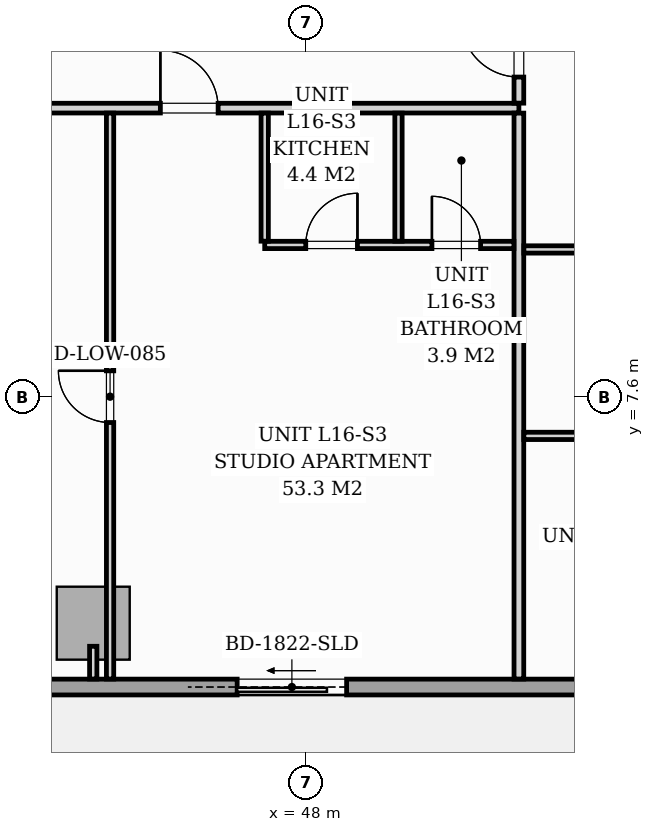
"""IFC4 building model, lengths in metres.
Left out: names, types, materials, properties, quantities, classifications, styles, units other than length and angle.
Written with IfcOpenShell. Run it as: python <this file> out.ifc"""

import sys

from ifc_helpers import new_model, si_unit, direction, frame, frame_2d, origin, origin_2d, place, context, subcontext, project, spatial, rectangle, extrude, source, transform, mapped, element, fill, save


model = new_model("IFC4")
c1 = context("Model", 3, precision=1e-05, world=origin(), true_north=direction((0.0, 1.0)))
c2 = subcontext(c1, "Body", "Model", "MODEL_VIEW")
j1 = project(units=[si_unit("LENGTHUNIT", "METRE"), si_unit("PLANEANGLEUNIT", "RADIAN")], contexts=[c1])
p1 = place(None, origin())
s1 = spatial("IfcSite", under=j1, at=p1, CompositionType="ELEMENT")
p2 = place(p1, origin())
s2 = spatial("IfcBuilding", under=s1, at=p2, CompositionType="ELEMENT")
p3 = place(p2, frame((0.0, 0.0, 58.2)))
s3 = spatial("IfcBuildingStorey", under=s2, at=p3, CompositionType="ELEMENT", Elevation=58.2)
m1 = source(origin(), c2, "Body", "SweptSolid", [
    extrude(rectangle(XDim=1.2, YDim=1.2, at=origin_2d()), origin(), (0.0, 0.0, 1.0), 3.196),
])
p4 = place(p3, frame((44.5, 3.88, 0.002), z_axis=(0.0, 0.0, 1.0), x_axis=(1.0, 0.0, 0.0)))
e1 = element("IfcColumn", 1, at=p4, inside=s3, PredefinedType="COLUMN", context=c2, shape_type="MappedRepresentation", body=[
    mapped(m1, transform((0.0, 0.0, 0.0), scale=1.0)),
])
p5 = place(p3, frame((57.3, 2.83, 0.0), z_axis=(0.0, 0.0, 1.0), x_axis=(-1.0, 0.0, 0.0)))
e2 = element("IfcWall", 2, at=p5, inside=s3, PredefinedType="STANDARD", context=c2, shape_type="SweptSolid", body=[
    extrude(rectangle(XDim=17.15, YDim=0.26, at=frame_2d((8.575, 0.0))), origin(), (0.0, 0.0, 1.0), 2.94),
])
p6 = place(p5, frame((8.633, 0.0, 0.0)))
e3 = element("IfcOpeningElement", 3, at=p6, cuts=e2, PredefinedType="OPENING", context=c2, shape_type="SweptSolid", body=[
    extrude(rectangle(XDim=1.8, YDim=2.06, at=frame_2d((0.9, 1.03))), frame((0.0, 0.14, 0.0), z_axis=(0.0, -1.0, 0.0), x_axis=(1.0, 0.0, 0.0)), (0.0, 0.0, 1.0), 0.28),
])
p7 = place(p5, frame((2.05, 0.0, 0.65)))
e4 = element("IfcOpeningElement", 4, at=p7, cuts=e2, PredefinedType="OPENING", context=c2, shape_type="SweptSolid", body=[
    extrude(rectangle(XDim=1.6, YDim=1.5, at=frame_2d((0.8, 0.75))), frame((0.0, 0.14, 0.0), z_axis=(0.0, -1.0, 0.0), x_axis=(1.0, 0.0, 0.0)), (0.0, 0.0, 1.0), 0.28),
])
p8 = place(p3, frame((16.3, 12.35, 0.0), z_axis=(0.0, 0.0, 1.0), x_axis=(1.0, 0.0, 0.0)))
e5 = element("IfcWall", 5, at=p8, inside=s3, PredefinedType="PARTITIONING", context=c2, shape_type="SweptSolid", body=[
    extrude(rectangle(XDim=35.2, YDim=0.16, at=frame_2d((17.6, 0.0))), origin(), (0.0, 0.0, 1.0), 2.94),
])
p9 = place(p8, frame((6.307, 0.0, 0.0)))
e6 = element("IfcOpeningElement", 6, at=p9, cuts=e5, PredefinedType="OPENING", context=c2, shape_type="SweptSolid", body=[
    extrude(rectangle(XDim=0.95, YDim=2.06, at=frame_2d((0.475, 1.03))), frame((0.0, 0.09, 0.0), z_axis=(0.0, -1.0, 0.0), x_axis=(1.0, 0.0, 0.0)), (0.0, 0.0, 1.0), 0.18),
])
p10 = place(p8, frame((18.392, 0.0, 0.0)))
e7 = element("IfcOpeningElement", 7, at=p10, cuts=e5, PredefinedType="OPENING", context=c2, shape_type="SweptSolid", body=[
    extrude(rectangle(XDim=0.95, YDim=2.06, at=frame_2d((0.475, 1.03))), frame((0.0, 0.09, 0.0), z_axis=(0.0, -1.0, 0.0), x_axis=(1.0, 0.0, 0.0)), (0.0, 0.0, 1.0), 0.18),
])
p11 = place(p8, frame((29.304, 0.0, 0.0)))
e8 = element("IfcOpeningElement", 8, at=p11, cuts=e5, PredefinedType="OPENING", context=c2, shape_type="SweptSolid", body=[
    extrude(rectangle(XDim=0.95, YDim=2.06, at=frame_2d((0.475, 1.03))), frame((0.0, 0.09, 0.0), z_axis=(0.0, -1.0, 0.0), x_axis=(1.0, 0.0, 0.0)), (0.0, 0.0, 1.0), 0.18),
])
p12 = place(p3, frame((51.5, 2.962, 0.0), z_axis=(0.0, 0.0, 1.0), x_axis=(0.0, 1.0, 0.0)))
e9 = element("IfcWall", 9, at=p12, inside=s3, PredefinedType="PARTITIONING", context=c2, shape_type="SweptSolid", body=[
    extrude(rectangle(XDim=9.306, YDim=0.16, at=frame_2d((4.653, 0.0))), origin(), (0.0, 0.0, 1.0), 2.94),
])
p13 = place(p3, frame((51.5, 12.432, 0.0), z_axis=(0.0, 0.0, 1.0), x_axis=(0.0, 1.0, 0.0)))
e10 = element("IfcWall", 10, at=p13, inside=s3, PredefinedType="PARTITIONING", context=c2, shape_type="SweptSolid", body=[
    extrude(rectangle(XDim=15.006, YDim=0.16, at=frame_2d((7.503, 0.0))), origin(), (0.0, 0.0, 1.0), 2.94),
])
p14 = place(p13, frame((0.429, 0.0, 0.0)))
e11 = element("IfcOpeningElement", 11, at=p14, cuts=e10, PredefinedType="OPENING", context=c2, shape_type="SweptSolid", body=[
    extrude(rectangle(XDim=0.95, YDim=2.06, at=frame_2d((0.475, 1.03))), frame((0.0, 0.09, 0.0), z_axis=(0.0, -1.0, 0.0), x_axis=(1.0, 0.0, 0.0)), (0.0, 0.0, 1.0), 0.18),
])
p15 = place(p3, frame((47.32, 10.1, 0.0), z_axis=(0.0, 0.0, 1.0), x_axis=(1.0, 0.0, 0.0)))
e12 = element("IfcWall", 12, at=p15, inside=s3, PredefinedType="PARTITIONING", context=c2, shape_type="SweptSolid", body=[
    extrude(rectangle(XDim=4.098, YDim=0.12, at=frame_2d((2.049, 0.0))), origin(), (0.0, 0.0, 1.0), 2.94),
])
p16 = place(p15, frame((0.675, 0.0, 0.0)))
e13 = element("IfcOpeningElement", 13, at=p16, cuts=e12, PredefinedType="OPENING", context=c2, shape_type="SweptSolid", body=[
    extrude(rectangle(XDim=0.85, YDim=2.05, at=frame_2d((0.425, 1.025))), frame((0.0, 0.07, 0.0), z_axis=(0.0, -1.0, 0.0), x_axis=(1.0, 0.0, 0.0)), (0.0, 0.0, 1.0), 0.14),
])
p17 = place(p15, frame((2.75, 0.0, 0.0)))
e14 = element("IfcOpeningElement", 14, at=p17, cuts=e12, PredefinedType="OPENING", context=c2, shape_type="SweptSolid", body=[
    extrude(rectangle(XDim=0.8, YDim=2.02, at=frame_2d((0.4, 1.01))), frame((0.0, 0.07, 0.0), z_axis=(0.0, -1.0, 0.0), x_axis=(1.0, 0.0, 0.0)), (0.0, 0.0, 1.0), 0.14),
])
for number, where, z_axis, x_axis in (
    (15, (47.32, 10.162, 0.0), (0.0, 0.0, 1.0), (0.0, 1.0, 0.0)),
    (16, (49.52, 10.162, 0.0), (0.0, 0.0, 1.0), (0.0, 1.0, 0.0)),
):
    element("IfcWall", number, at=place(p3, frame(where, z_axis=z_axis, x_axis=x_axis)), inside=s3, PredefinedType="PARTITIONING", context=c2, shape_type="SweptSolid", body=[
        extrude(rectangle(XDim=2.106, YDim=0.12, at=frame_2d((1.053, 0.0))), origin(), (0.0, 0.0, 1.0), 2.94),
    ])
p18 = place(p3, frame((44.777, 2.962, 0.0), z_axis=(0.0, 0.0, 1.0), x_axis=(0.0, 1.0, 0.0)))
e17 = element("IfcWall", 17, at=p18, inside=s3, PredefinedType="PARTITIONING", context=c2, shape_type="SweptSolid", body=[
    extrude(rectangle(XDim=9.306, YDim=0.12, at=frame_2d((4.653, 0.0))), origin(), (0.0, 0.0, 1.0), 2.136),
])
p19 = place(p18, frame((4.218, 0.0, 0.0)))
e18 = element("IfcOpeningElement", 18, at=p19, cuts=e17, PredefinedType="OPENING", context=c2, shape_type="SweptSolid", body=[
    extrude(rectangle(XDim=0.85, YDim=2.01, at=frame_2d((0.425, 1.005))), frame((0.0, 0.07, 0.0), z_axis=(0.0, -1.0, 0.0), x_axis=(1.0, 0.0, 0.0)), (0.0, 0.0, 1.0), 0.14),
])
p20 = place(p3, frame((51.582, 6.96, 0.0), z_axis=(0.0, 0.0, 1.0), x_axis=(1.0, 0.0, 0.0)))
e19 = element("IfcWall", 19, at=p20, inside=s3, PredefinedType="PARTITIONING", context=c2, shape_type="SweptSolid", body=[
    extrude(rectangle(XDim=8.138, YDim=0.12, at=frame_2d((4.069, 0.0))), origin(), (0.0, 0.0, 1.0), 2.94),
])
p21 = place(p20, frame((3.653, 0.0, 0.0)))
e20 = element("IfcOpeningElement", 20, at=p21, cuts=e19, PredefinedType="OPENING", context=c2, shape_type="SweptSolid", body=[
    extrude(rectangle(XDim=0.85, YDim=2.05, at=frame_2d((0.425, 1.025))), frame((0.0, 0.07, 0.0), z_axis=(0.0, -1.0, 0.0), x_axis=(1.0, 0.0, 0.0)), (0.0, 0.0, 1.0), 0.14),
])
p22 = place(p3, frame((51.582, 10.026, 0.0), z_axis=(0.0, 0.0, 1.0), x_axis=(1.0, 0.0, 0.0)))
e21 = element("IfcWall", 21, at=p22, inside=s3, PredefinedType="PARTITIONING", context=c2, shape_type="SweptSolid", body=[
    extrude(rectangle(XDim=8.138, YDim=0.12, at=frame_2d((4.069, 0.0))), origin(), (0.0, 0.0, 1.0), 2.94),
])
p23 = place(p22, frame((3.653, 0.0, 0.0)))
e22 = element("IfcOpeningElement", 22, at=p23, cuts=e21, PredefinedType="OPENING", context=c2, shape_type="SweptSolid", body=[
    extrude(rectangle(XDim=0.85, YDim=2.05, at=frame_2d((0.425, 1.025))), frame((0.0, 0.07, 0.0), z_axis=(0.0, -1.0, 0.0), x_axis=(1.0, 0.0, 0.0)), (0.0, 0.0, 1.0), 0.14),
])
p24 = place(p3, frame((44.5, 3.5, 0.0), z_axis=(0.0, 0.0, 1.0), x_axis=(0.0, -1.0, 0.0)))
e23 = element("IfcWall", 23, at=p24, inside=s3, PredefinedType="PARTITIONING", context=c2, shape_type="SweptSolid", body=[
    extrude(rectangle(XDim=0.538, YDim=0.12, at=frame_2d((0.269, 0.0))), origin(), (0.0, 0.0, 1.0), 2.94),
])
m2 = source(origin(), c2, "Body", "SweptSolid", [
    extrude(rectangle(XDim=1.8, YDim=2.06, at=frame_2d((0.9, 1.03))), frame((0.0, 0.025, 0.0), z_axis=(0.0, -1.0, 0.0), x_axis=(1.0, 0.0, 0.0)), (0.0, 0.0, 1.0), 0.05),
])
p25 = place(p6, origin())
e24 = element("IfcDoor", 24, at=p25, inside=s3, OperationType="SLIDING_TO_RIGHT", PredefinedType="DOOR", context=c2, shape_type="MappedRepresentation", body=[
    mapped(m2, transform((0.0, 0.0, 0.0), scale=1.0)),
])
fill(e3, e24)
m3 = source(origin(), c2, "Body", "SweptSolid", [
    extrude(rectangle(XDim=0.85, YDim=2.01, at=frame_2d((0.425, 1.005))), frame((0.0, 0.025, 0.0), z_axis=(0.0, -1.0, 0.0), x_axis=(1.0, 0.0, 0.0)), (0.0, 0.0, 1.0), 0.05),
])
p26 = place(p19, origin())
e25 = element("IfcDoor", 25, at=p26, inside=s3, OperationType="SINGLE_SWING_RIGHT", PredefinedType="DOOR", context=c2, shape_type="MappedRepresentation", body=[
    mapped(m3, transform((0.0, 0.0, 0.0), scale=1.0)),
])
fill(e18, e25)
m4 = source(origin(), c2, "Body", "SweptSolid", [
    extrude(rectangle(XDim=0.95, YDim=2.06, at=frame_2d((0.475, 1.03))), frame((0.0, 0.025, 0.0), z_axis=(0.0, -1.0, 0.0), x_axis=(1.0, 0.0, 0.0)), (0.0, 0.0, 1.0), 0.05),
])
p27 = place(p11, origin())
e26 = element("IfcDoor", 26, at=p27, inside=s3, OperationType="SINGLE_SWING_LEFT", PredefinedType="DOOR", context=c2, shape_type="MappedRepresentation", body=[
    mapped(m4, transform((0.0, 0.0, 0.0), scale=1.0)),
])
fill(e8, e26)
m5 = source(origin(), c2, "Body", "SweptSolid", [
    extrude(rectangle(XDim=0.85, YDim=2.05, at=frame_2d((0.425, 1.025))), frame((0.0, 0.025, 0.0), z_axis=(0.0, -1.0, 0.0), x_axis=(1.0, 0.0, 0.0)), (0.0, 0.0, 1.0), 0.05),
])
p28 = place(p16, origin())
e27 = element("IfcDoor", 27, at=p28, inside=s3, OperationType="SINGLE_SWING_RIGHT", PredefinedType="DOOR", context=c2, shape_type="MappedRepresentation", body=[
    mapped(m5, transform((0.0, 0.0, 0.0), scale=1.0)),
])
fill(e13, e27)
m6 = source(origin(), c2, "Body", "SweptSolid", [
    extrude(rectangle(XDim=0.8, YDim=2.02, at=frame_2d((0.4, 1.01))), frame((0.0, 0.025, 0.0), z_axis=(0.0, -1.0, 0.0), x_axis=(1.0, 0.0, 0.0)), (0.0, 0.0, 1.0), 0.05),
])
p29 = place(p17, origin())
e28 = element("IfcDoor", 28, at=p29, inside=s3, OperationType="SINGLE_SWING_LEFT", PredefinedType="DOOR", context=c2, shape_type="MappedRepresentation", body=[
    mapped(m6, transform((0.0, 0.0, 0.0), scale=1.0)),
])
fill(e14, e28)
p30 = place(p14, origin())
e29 = element("IfcDoor", 29, at=p30, inside=s3, OperationType="SINGLE_SWING_RIGHT", PredefinedType="DOOR", context=c2, shape_type="MappedRepresentation", body=[
    mapped(m4, transform((0.0, 0.0, 0.0), scale=1.0)),
])
fill(e11, e29)
save(model, sys.argv[1])
